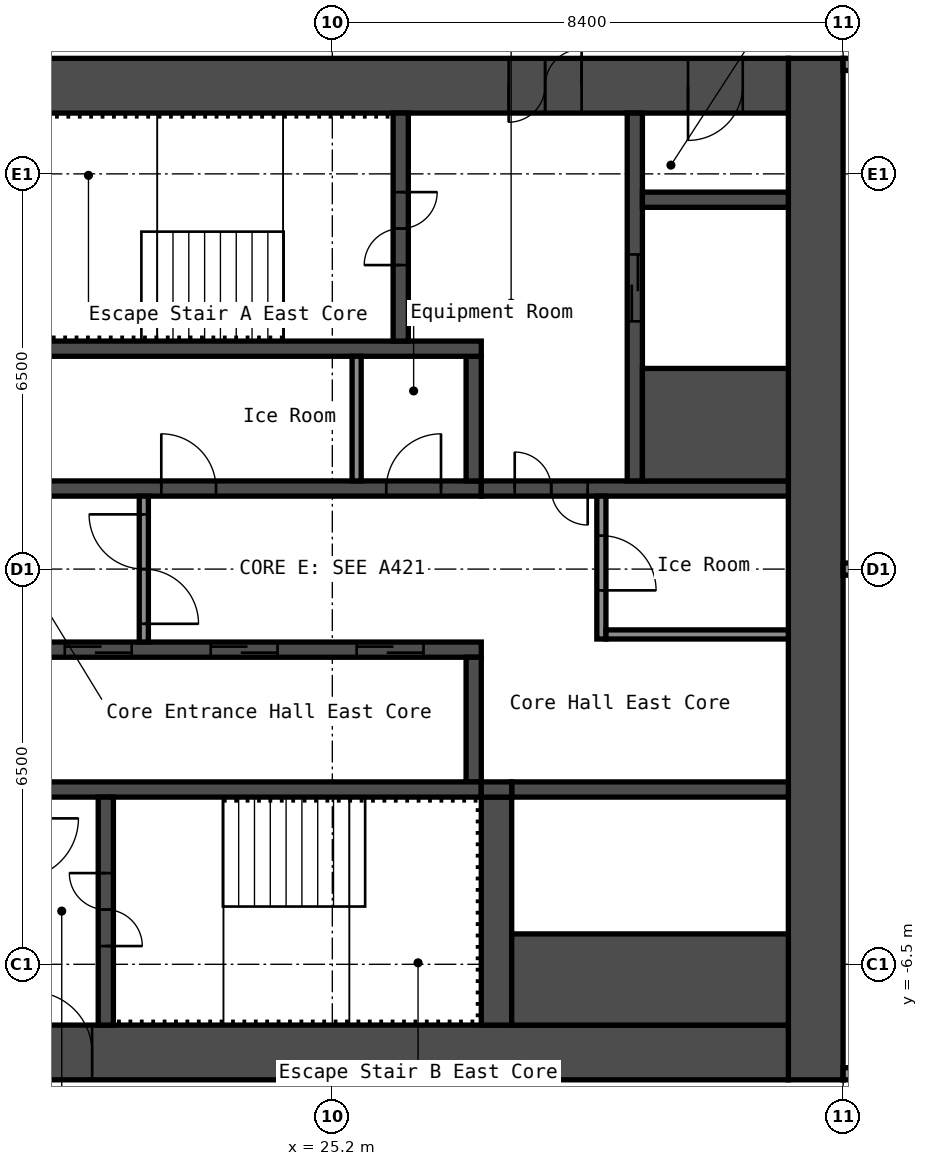
"""IFC4 building model, lengths in metres.
Left out: names, types, materials, properties, quantities, classifications, styles, units other than length and angle.
Written with IfcOpenShell. Run it as: python <this file> out.ifc"""

import sys

from ifc_helpers import new_model, si_unit, direction, frame, frame_2d, origin, place, context, subcontext, project, spatial, rectangle, extrude, element, fill, save


model = new_model("IFC4")
c1 = context("Model", 3, precision=1e-05, world=origin(), true_north=direction((0.0, 1.0)))
c2 = subcontext(c1, "Body", "Model", "MODEL_VIEW")
j1 = project(units=[si_unit("LENGTHUNIT", "METRE"), si_unit("PLANEANGLEUNIT", "RADIAN")], contexts=[c1])
p1 = place(None, origin())
s1 = spatial("IfcSite", under=j1, at=p1, CompositionType="ELEMENT")
p2 = place(p1, origin())
s2 = spatial("IfcBuilding", under=s1, at=p2, CompositionType="ELEMENT")
p3 = place(p2, frame((0.0, 0.0, 134.2)))
s3 = spatial("IfcBuildingStorey", under=s2, at=p3, CompositionType="ELEMENT", Elevation=134.2)
p4 = place(p3, frame((33.15, -8.4, 0.0), z_axis=(0.0, 0.0, 1.0), x_axis=(0.0, 1.0, 0.0)))
e1 = element("IfcWall", 1, at=p4, inside=s3, PredefinedType="SHEAR", context=c2, shape_type="SweptSolid", body=[
    extrude(rectangle(XDim=16.8, YDim=0.9, at=frame_2d((8.4, 0.0))), origin(), (0.0, 0.0, 1.0), 2.75),
])
p5 = place(p3, frame((17.7, 7.95, 0.0), z_axis=(0.0, 0.0, 1.0), x_axis=(1.0, 0.0, 0.0)))
e2 = element("IfcWall", 2, at=p5, inside=s3, PredefinedType="SHEAR", context=c2, shape_type="SweptSolid", body=[
    extrude(rectangle(XDim=15.0, YDim=0.9, at=frame_2d((7.5, 0.0))), origin(), (0.0, 0.0, 1.0), 2.75),
])
p6 = place(p5, frame((10.4, 0.0, 0.0)))
e3 = element("IfcOpeningElement", 3, at=p6, cuts=e2, PredefinedType="OPENING", context=c2, shape_type="SweptSolid", body=[
    extrude(rectangle(XDim=1.2, YDim=2.1, at=frame_2d((0.6, 1.05))), frame((0.0, 0.46, 0.0), z_axis=(0.0, -1.0, 0.0), x_axis=(1.0, 0.0, 0.0)), (0.0, 0.0, 1.0), 0.92),
])
p7 = place(p5, frame((13.35, 0.0, 0.0)))
e4 = element("IfcOpeningElement", 4, at=p7, cuts=e2, PredefinedType="OPENING", context=c2, shape_type="SweptSolid", body=[
    extrude(rectangle(XDim=0.9, YDim=2.1, at=frame_2d((0.45, 1.05))), frame((0.0, 0.46, 0.0), z_axis=(0.0, -1.0, 0.0), x_axis=(1.0, 0.0, 0.0)), (0.0, 0.0, 1.0), 0.92),
])
p8 = place(p3, frame((17.7, -7.95, 0.0), z_axis=(0.0, 0.0, 1.0), x_axis=(1.0, 0.0, 0.0)))
e5 = element("IfcWall", 5, at=p8, inside=s3, PredefinedType="SHEAR", context=c2, shape_type="SweptSolid", body=[
    extrude(rectangle(XDim=15.0, YDim=0.9, at=frame_2d((7.5, 0.0))), origin(), (0.0, 0.0, 1.0), 2.75),
])
p9 = place(p8, frame((2.55, 0.0, 0.0)))
e6 = element("IfcOpeningElement", 6, at=p9, cuts=e5, PredefinedType="OPENING", context=c2, shape_type="SweptSolid", body=[
    extrude(rectangle(XDim=1.0, YDim=2.1, at=frame_2d((0.5, 1.05))), frame((0.0, 0.46, 0.0), z_axis=(0.0, -1.0, 0.0), x_axis=(1.0, 0.0, 0.0)), (0.0, 0.0, 1.0), 0.92),
])
p10 = place(p3, frame((20.15, 1.325, 0.0), z_axis=(0.0, 0.0, 1.0), x_axis=(1.0, 0.0, 0.0)))
e7 = element("IfcWall", 7, at=p10, inside=s3, PredefinedType="SHEAR", context=c2, shape_type="SweptSolid", body=[
    extrude(rectangle(XDim=7.5, YDim=0.25, at=frame_2d((3.75, 0.0))), origin(), (0.0, 0.0, 1.0), 2.75),
])
p11 = place(p10, frame((2.238, 0.0, 0.0)))
e8 = element("IfcOpeningElement", 8, at=p11, cuts=e7, PredefinedType="OPENING", context=c2, shape_type="SweptSolid", body=[
    extrude(rectangle(XDim=0.9, YDim=2.1, at=frame_2d((0.45, 1.05))), frame((0.0, 0.135, 0.0), z_axis=(0.0, -1.0, 0.0), x_axis=(1.0, 0.0, 0.0)), (0.0, 0.0, 1.0), 0.27),
])
p12 = place(p10, frame((5.938, 0.0, 0.0)))
e9 = element("IfcOpeningElement", 9, at=p12, cuts=e7, PredefinedType="OPENING", context=c2, shape_type="SweptSolid", body=[
    extrude(rectangle(XDim=0.9, YDim=2.1, at=frame_2d((0.45, 1.05))), frame((0.0, 0.135, 0.0), z_axis=(0.0, -1.0, 0.0), x_axis=(1.0, 0.0, 0.0)), (0.0, 0.0, 1.0), 0.27),
])
p13 = place(p3, frame((27.525, 1.45, 0.0), z_axis=(0.0, 0.0, 1.0), x_axis=(0.0, 1.0, 0.0)))
e10 = element("IfcWall", 10, at=p13, inside=s3, PredefinedType="SHEAR", context=c2, shape_type="SweptSolid", body=[
    extrude(rectangle(XDim=2.05, YDim=0.25, at=frame_2d((1.025, 0.0))), origin(), (0.0, 0.0, 1.0), 2.75),
])
p14 = place(p3, frame((20.15, 3.625, 0.0), z_axis=(0.0, 0.0, 1.0), x_axis=(1.0, 0.0, 0.0)))
e11 = element("IfcWall", 11, at=p14, inside=s3, PredefinedType="SHEAR", context=c2, shape_type="SweptSolid", body=[
    extrude(rectangle(XDim=7.5, YDim=0.25, at=frame_2d((3.75, 0.0))), origin(), (0.0, 0.0, 1.0), 2.75),
])
p15 = place(p3, frame((26.325, 3.75, 0.0), z_axis=(0.0, 0.0, 1.0), x_axis=(0.0, 1.0, 0.0)))
e12 = element("IfcWall", 12, at=p15, inside=s3, PredefinedType="SHEAR", context=c2, shape_type="SweptSolid", body=[
    extrude(rectangle(XDim=3.75, YDim=0.25, at=frame_2d((1.875, 0.0))), origin(), (0.0, 0.0, 1.0), 2.75),
])
p16 = place(p15, frame((1.25, 0.0, 0.0)))
e13 = element("IfcOpeningElement", 13, at=p16, cuts=e12, PredefinedType="OPENING", context=c2, shape_type="SweptSolid", body=[
    extrude(rectangle(XDim=1.2, YDim=2.1, at=frame_2d((0.6, 1.05))), frame((0.0, 0.135, 0.0), z_axis=(0.0, -1.0, 0.0), x_axis=(1.0, 0.0, 0.0)), (0.0, 0.0, 1.0), 0.27),
])
p17 = place(p3, frame((27.65, 1.325, 0.0), z_axis=(0.0, 0.0, 1.0), x_axis=(1.0, 0.0, 0.0)))
e14 = element("IfcWall", 14, at=p17, inside=s3, PredefinedType="SHEAR", context=c2, shape_type="SweptSolid", body=[
    extrude(rectangle(XDim=5.05, YDim=0.25, at=frame_2d((2.525, 0.0))), origin(), (0.0, 0.0, 1.0), 2.75),
])
p18 = place(p17, frame((0.55, 0.0, 0.0)))
e15 = element("IfcOpeningElement", 15, at=p18, cuts=e14, PredefinedType="OPENING", context=c2, shape_type="SweptSolid", body=[
    extrude(rectangle(XDim=1.2, YDim=2.1, at=frame_2d((0.6, 1.05))), frame((0.0, 0.135, 0.0), z_axis=(0.0, -1.0, 0.0), x_axis=(1.0, 0.0, 0.0)), (0.0, 0.0, 1.0), 0.27),
])
p19 = place(p3, frame((30.175, 1.45, 0.0), z_axis=(0.0, 0.0, 1.0), x_axis=(0.0, 1.0, 0.0)))
e16 = element("IfcWall", 16, at=p19, inside=s3, PredefinedType="SHEAR", context=c2, shape_type="SweptSolid", body=[
    extrude(rectangle(XDim=6.05, YDim=0.25, at=frame_2d((3.025, 0.0))), origin(), (0.0, 0.0, 1.0), 2.75),
])
p20 = place(p19, frame((2.625, 0.0, 0.0)))
e17 = element("IfcOpeningElement", 17, at=p20, cuts=e16, PredefinedType="OPENING", context=c2, shape_type="SweptSolid", body=[
    extrude(rectangle(XDim=1.1, YDim=2.1, at=frame_2d((0.55, 1.05))), frame((0.0, 0.135, 0.0), z_axis=(0.0, -1.0, 0.0), x_axis=(1.0, 0.0, 0.0)), (0.0, 0.0, 1.0), 0.27),
])
p21 = place(p3, frame((30.3, 2.375, 0.0), z_axis=(0.0, 0.0, 1.0), x_axis=(1.0, 0.0, 0.0)))
e18 = element("IfcWall", 18, at=p21, inside=s3, PredefinedType="SHEAR", context=c2, shape_type="SweptSolid", body=[
    extrude(rectangle(XDim=2.4, YDim=1.85, at=frame_2d((1.2, 0.0))), origin(), (0.0, 0.0, 1.0), 2.75),
])
p22 = place(p3, frame((30.3, 6.075, 0.0), z_axis=(0.0, 0.0, 1.0), x_axis=(1.0, 0.0, 0.0)))
e19 = element("IfcWall", 19, at=p22, inside=s3, PredefinedType="SHEAR", context=c2, shape_type="SweptSolid", body=[
    extrude(rectangle(XDim=2.4, YDim=0.25, at=frame_2d((1.2, 0.0))), origin(), (0.0, 0.0, 1.0), 2.75),
])
p23 = place(p3, frame((20.15, -1.325, 0.0), z_axis=(0.0, 0.0, 1.0), x_axis=(1.0, 0.0, 0.0)))
e20 = element("IfcWall", 20, at=p23, inside=s3, PredefinedType="SHEAR", context=c2, shape_type="SweptSolid", body=[
    extrude(rectangle(XDim=7.5, YDim=0.25, at=frame_2d((3.75, 0.0))), origin(), (0.0, 0.0, 1.0), 2.75),
])
p24 = place(p23, frame((0.65, 0.0, 0.0)))
e21 = element("IfcOpeningElement", 21, at=p24, cuts=e20, PredefinedType="OPENING", context=c2, shape_type="SweptSolid", body=[
    extrude(rectangle(XDim=1.1, YDim=2.1, at=frame_2d((0.55, 1.05))), frame((0.0, 0.135, 0.0), z_axis=(0.0, -1.0, 0.0), x_axis=(1.0, 0.0, 0.0)), (0.0, 0.0, 1.0), 0.27),
])
p25 = place(p23, frame((3.05, 0.0, 0.0)))
e22 = element("IfcOpeningElement", 22, at=p25, cuts=e20, PredefinedType="OPENING", context=c2, shape_type="SweptSolid", body=[
    extrude(rectangle(XDim=1.1, YDim=2.1, at=frame_2d((0.55, 1.05))), frame((0.0, 0.135, 0.0), z_axis=(0.0, -1.0, 0.0), x_axis=(1.0, 0.0, 0.0)), (0.0, 0.0, 1.0), 0.27),
])
p26 = place(p23, frame((5.45, 0.0, 0.0)))
e23 = element("IfcOpeningElement", 23, at=p26, cuts=e20, PredefinedType="OPENING", context=c2, shape_type="SweptSolid", body=[
    extrude(rectangle(XDim=1.1, YDim=2.1, at=frame_2d((0.55, 1.05))), frame((0.0, 0.135, 0.0), z_axis=(0.0, -1.0, 0.0), x_axis=(1.0, 0.0, 0.0)), (0.0, 0.0, 1.0), 0.27),
])
p27 = place(p3, frame((27.525, -3.5, 0.0), z_axis=(0.0, 0.0, 1.0), x_axis=(0.0, 1.0, 0.0)))
e24 = element("IfcWall", 24, at=p27, inside=s3, PredefinedType="SHEAR", context=c2, shape_type="SweptSolid", body=[
    extrude(rectangle(XDim=2.05, YDim=0.25, at=frame_2d((1.025, 0.0))), origin(), (0.0, 0.0, 1.0), 2.75),
])
p28 = place(p3, frame((20.15, -3.625, 0.0), z_axis=(0.0, 0.0, 1.0), x_axis=(1.0, 0.0, 0.0)))
e25 = element("IfcWall", 25, at=p28, inside=s3, PredefinedType="SHEAR", context=c2, shape_type="SweptSolid", body=[
    extrude(rectangle(XDim=7.5, YDim=0.25, at=frame_2d((3.75, 0.0))), origin(), (0.0, 0.0, 1.0), 2.75),
])
p29 = place(p3, frame((21.475, -7.5, 0.0), z_axis=(0.0, 0.0, 1.0), x_axis=(0.0, 1.0, 0.0)))
e26 = element("IfcWall", 26, at=p29, inside=s3, PredefinedType="SHEAR", context=c2, shape_type="SweptSolid", body=[
    extrude(rectangle(XDim=3.75, YDim=0.25, at=frame_2d((1.875, 0.0))), origin(), (0.0, 0.0, 1.0), 2.75),
])
p30 = place(p29, frame((1.3, 0.0, 0.0)))
e27 = element("IfcOpeningElement", 27, at=p30, cuts=e26, PredefinedType="OPENING", context=c2, shape_type="SweptSolid", body=[
    extrude(rectangle(XDim=1.2, YDim=2.1, at=frame_2d((0.6, 1.05))), frame((0.0, 0.135, 0.0), z_axis=(0.0, -1.0, 0.0), x_axis=(1.0, 0.0, 0.0)), (0.0, 0.0, 1.0), 0.27),
])
p31 = place(p3, frame((27.9, -7.5, 0.0), z_axis=(0.0, 0.0, 1.0), x_axis=(0.0, 1.0, 0.0)))
e28 = element("IfcWall", 28, at=p31, inside=s3, PredefinedType="SHEAR", context=c2, shape_type="SweptSolid", body=[
    extrude(rectangle(XDim=3.75, YDim=0.5, at=frame_2d((1.875, 0.0))), origin(), (0.0, 0.0, 1.0), 2.75),
])
p32 = place(p3, frame((28.15, -3.625, 0.0), z_axis=(0.0, 0.0, 1.0), x_axis=(1.0, 0.0, 0.0)))
e29 = element("IfcWall", 29, at=p32, inside=s3, PredefinedType="SHEAR", context=c2, shape_type="SweptSolid", body=[
    extrude(rectangle(XDim=4.55, YDim=0.25, at=frame_2d((2.275, 0.0))), origin(), (0.0, 0.0, 1.0), 2.75),
])
p33 = place(p3, frame((28.15, -6.75, 0.0), z_axis=(0.0, 0.0, 1.0), x_axis=(1.0, 0.0, 0.0)))
e30 = element("IfcWall", 30, at=p33, inside=s3, PredefinedType="SHEAR", context=c2, shape_type="SweptSolid", body=[
    extrude(rectangle(XDim=4.55, YDim=1.5, at=frame_2d((2.275, 0.0))), origin(), (0.0, 0.0, 1.0), 2.75),
])
p34 = place(p3, frame((27.65, -3.625, 0.0), z_axis=(0.0, 0.0, 1.0), x_axis=(1.0, 0.0, 0.0)))
e31 = element("IfcWall", 31, at=p34, inside=s3, PredefinedType="SHEAR", context=c2, shape_type="SweptSolid", body=[
    extrude(rectangle(XDim=0.5, YDim=0.25, at=frame_2d((0.25, 0.0))), origin(), (0.0, 0.0, 1.0), 2.75),
])
p35 = place(p3, frame((22.1, -1.2, 0.0), z_axis=(0.0, 0.0, 1.0), x_axis=(0.0, 1.0, 0.0)))
e32 = element("IfcWall", 32, at=p35, inside=s3, PredefinedType="PARTITIONING", context=c2, shape_type="SweptSolid", body=[
    extrude(rectangle(XDim=2.4, YDim=0.15, at=frame_2d((1.2, 0.0))), origin(), (0.0, 0.0, 1.0), 2.75),
])
p36 = place(p35, frame((0.3, 0.0, 0.0)))
e33 = element("IfcOpeningElement", 33, at=p36, cuts=e32, PredefinedType="OPENING", context=c2, shape_type="SweptSolid", body=[
    extrude(rectangle(XDim=1.8, YDim=2.1, at=frame_2d((0.9, 1.05))), frame((0.0, 0.085, 0.0), z_axis=(0.0, -1.0, 0.0), x_axis=(1.0, 0.0, 0.0)), (0.0, 0.0, 1.0), 0.17),
])
p37 = place(p3, frame((29.625, -1.15, 0.0), z_axis=(0.0, 0.0, 1.0), x_axis=(0.0, 1.0, 0.0)))
e34 = element("IfcWall", 34, at=p37, inside=s3, PredefinedType="PARTITIONING", context=c2, shape_type="SweptSolid", body=[
    extrude(rectangle(XDim=2.35, YDim=0.15, at=frame_2d((1.175, 0.0))), origin(), (0.0, 0.0, 1.0), 2.75),
])
p38 = place(p37, frame((0.8, 0.0, 0.0)))
e35 = element("IfcOpeningElement", 35, at=p38, cuts=e34, PredefinedType="OPENING", context=c2, shape_type="SweptSolid", body=[
    extrude(rectangle(XDim=0.9, YDim=2.1, at=frame_2d((0.45, 1.05))), frame((0.0, 0.085, 0.0), z_axis=(0.0, -1.0, 0.0), x_axis=(1.0, 0.0, 0.0)), (0.0, 0.0, 1.0), 0.17),
])
p39 = place(p3, frame((29.7, -1.075, 0.0), z_axis=(0.0, 0.0, 1.0), x_axis=(1.0, 0.0, 0.0)))
e36 = element("IfcWall", 36, at=p39, inside=s3, PredefinedType="PARTITIONING", context=c2, shape_type="SweptSolid", body=[
    extrude(rectangle(XDim=3.0, YDim=0.15, at=frame_2d((1.5, 0.0))), origin(), (0.0, 0.0, 1.0), 2.75),
])
p40 = place(p3, frame((25.6, 1.45, 0.0), z_axis=(0.0, 0.0, 1.0), x_axis=(0.0, 1.0, 0.0)))
e37 = element("IfcWall", 37, at=p40, inside=s3, PredefinedType="PARTITIONING", context=c2, shape_type="SweptSolid", body=[
    extrude(rectangle(XDim=2.05, YDim=0.15, at=frame_2d((1.025, 0.0))), origin(), (0.0, 0.0, 1.0), 2.75),
])
p41 = place(p3, frame((33.6, -8.3, 0.0), z_axis=(0.0, 0.0, 1.0), x_axis=(1.0, 0.0, 0.0)))
e38 = element("IfcWall", 38, at=p41, inside=s3, PredefinedType="PARTITIONING", context=c2, shape_type="SweptSolid", body=[
    extrude(rectangle(XDim=6.6, YDim=0.2, at=frame_2d((3.3, 0.0))), origin(), (0.0, 0.0, 1.0), 2.75),
])
p42 = place(p41, frame((0.74, 0.0, 0.0)))
e39 = element("IfcOpeningElement", 39, at=p42, cuts=e38, PredefinedType="OPENING", context=c2, shape_type="SweptSolid", body=[
    extrude(rectangle(XDim=0.9, YDim=2.1, at=frame_2d((0.45, 1.05))), frame((0.0, 0.11, 0.0), z_axis=(0.0, -1.0, 0.0), x_axis=(1.0, 0.0, 0.0)), (0.0, 0.0, 1.0), 0.22),
])
p43 = place(p41, frame((4.04, 0.0, 0.0)))
e40 = element("IfcOpeningElement", 40, at=p43, cuts=e38, PredefinedType="OPENING", context=c2, shape_type="SweptSolid", body=[
    extrude(rectangle(XDim=0.9, YDim=2.1, at=frame_2d((0.45, 1.05))), frame((0.0, 0.11, 0.0), z_axis=(0.0, -1.0, 0.0), x_axis=(1.0, 0.0, 0.0)), (0.0, 0.0, 1.0), 0.22),
])
p44 = place(p3, frame((33.6, 0.0, 0.0), z_axis=(0.0, 0.0, 1.0), x_axis=(1.0, 0.0, 0.0)))
e41 = element("IfcWall", 41, at=p44, inside=s3, PredefinedType="PARTITIONING", context=c2, shape_type="SweptSolid", body=[
    extrude(rectangle(XDim=6.5, YDim=0.2, at=frame_2d((3.25, 0.0))), origin(), (0.0, 0.0, 1.0), 2.75),
])
p45 = place(p3, frame((33.6, 8.3, 0.0), z_axis=(0.0, 0.0, 1.0), x_axis=(1.0, 0.0, 0.0)))
e42 = element("IfcWall", 42, at=p45, inside=s3, PredefinedType="PARTITIONING", context=c2, shape_type="SweptSolid", body=[
    extrude(rectangle(XDim=6.6, YDim=0.2, at=frame_2d((3.3, 0.0))), origin(), (0.0, 0.0, 1.0), 2.75),
])
p46 = place(p45, frame((1.33, 0.0, 0.0)))
e43 = element("IfcOpeningElement", 43, at=p46, cuts=e42, PredefinedType="OPENING", context=c2, shape_type="SweptSolid", body=[
    extrude(rectangle(XDim=0.9, YDim=2.1, at=frame_2d((0.45, 1.05))), frame((0.0, 0.11, 0.0), z_axis=(0.0, -1.0, 0.0), x_axis=(1.0, 0.0, 0.0)), (0.0, 0.0, 1.0), 0.22),
])
p47 = place(p45, frame((4.63, 0.0, 0.0)))
e44 = element("IfcOpeningElement", 44, at=p47, cuts=e42, PredefinedType="OPENING", context=c2, shape_type="SweptSolid", body=[
    extrude(rectangle(XDim=0.9, YDim=2.1, at=frame_2d((0.45, 1.05))), frame((0.0, 0.11, 0.0), z_axis=(0.0, -1.0, 0.0), x_axis=(1.0, 0.0, 0.0)), (0.0, 0.0, 1.0), 0.22),
])
p48 = place(p6, origin())
e45 = element("IfcDoor", 45, at=p48, inside=s3, OperationType="DOUBLE_DOOR_SINGLE_SWING", PredefinedType="DOOR", context=c2, shape_type="SweptSolid", body=[
    extrude(rectangle(XDim=1.2, YDim=2.1, at=frame_2d((0.6, 1.05))), frame((0.0, 0.025, 0.0), z_axis=(0.0, -1.0, 0.0), x_axis=(1.0, 0.0, 0.0)), (0.0, 0.0, 1.0), 0.05),
])
fill(e3, e45)
p49 = place(p7, origin())
e46 = element("IfcDoor", 46, at=p49, inside=s3, OperationType="SINGLE_SWING_LEFT", PredefinedType="DOOR", context=c2, shape_type="SweptSolid", body=[
    extrude(rectangle(XDim=0.9, YDim=2.1, at=frame_2d((0.45, 1.05))), frame((0.0, 0.025, 0.0), z_axis=(0.0, -1.0, 0.0), x_axis=(1.0, 0.0, 0.0)), (0.0, 0.0, 1.0), 0.05),
])
fill(e4, e46)
p50 = place(p9, origin())
e47 = element("IfcDoor", 47, at=p50, inside=s3, OperationType="SINGLE_SWING_RIGHT", PredefinedType="DOOR", context=c2, shape_type="SweptSolid", body=[
    extrude(rectangle(XDim=1.0, YDim=2.1, at=frame_2d((0.5, 1.05))), frame((0.0, 0.025, 0.0), z_axis=(0.0, -1.0, 0.0), x_axis=(1.0, 0.0, 0.0)), (0.0, 0.0, 1.0), 0.05),
])
fill(e6, e47)
p51 = place(p16, origin())
e48 = element("IfcDoor", 48, at=p51, inside=s3, OperationType="DOUBLE_DOOR_SINGLE_SWING", PredefinedType="DOOR", context=c2, shape_type="SweptSolid", body=[
    extrude(rectangle(XDim=1.2, YDim=2.1, at=frame_2d((0.6, 1.05))), frame((0.0, 0.025, 0.0), z_axis=(0.0, -1.0, 0.0), x_axis=(1.0, 0.0, 0.0)), (0.0, 0.0, 1.0), 0.05),
])
fill(e13, e48)
p52 = place(p30, origin())
e49 = element("IfcDoor", 49, at=p52, inside=s3, OperationType="DOUBLE_DOOR_SINGLE_SWING", PredefinedType="DOOR", context=c2, shape_type="SweptSolid", body=[
    extrude(rectangle(XDim=1.2, YDim=2.1, at=frame_2d((0.6, 1.05))), frame((0.0, 0.025, 0.0), z_axis=(0.0, -1.0, 0.0), x_axis=(1.0, 0.0, 0.0)), (0.0, 0.0, 1.0), 0.05),
])
fill(e27, e49)
p53 = place(p18, origin())
e50 = element("IfcDoor", 50, at=p53, inside=s3, OperationType="DOUBLE_DOOR_SINGLE_SWING", PredefinedType="DOOR", context=c2, shape_type="SweptSolid", body=[
    extrude(rectangle(XDim=1.2, YDim=2.1, at=frame_2d((0.6, 1.05))), frame((0.0, 0.025, 0.0), z_axis=(0.0, -1.0, 0.0), x_axis=(1.0, 0.0, 0.0)), (0.0, 0.0, 1.0), 0.05),
])
fill(e15, e50)
p54 = place(p36, origin())
e51 = element("IfcDoor", 51, at=p54, inside=s3, OperationType="DOUBLE_DOOR_SINGLE_SWING", PredefinedType="DOOR", context=c2, shape_type="SweptSolid", body=[
    extrude(rectangle(XDim=1.8, YDim=2.1, at=frame_2d((0.9, 1.05))), frame((0.0, 0.025, 0.0), z_axis=(0.0, -1.0, 0.0), x_axis=(1.0, 0.0, 0.0)), (0.0, 0.0, 1.0), 0.05),
])
fill(e33, e51)
p55 = place(p38, origin())
e52 = element("IfcDoor", 52, at=p55, inside=s3, OperationType="SINGLE_SWING_LEFT", PredefinedType="DOOR", context=c2, shape_type="SweptSolid", body=[
    extrude(rectangle(XDim=0.9, YDim=2.1, at=frame_2d((0.45, 1.05))), frame((0.0, 0.025, 0.0), z_axis=(0.0, -1.0, 0.0), x_axis=(1.0, 0.0, 0.0)), (0.0, 0.0, 1.0), 0.05),
])
fill(e35, e52)
p56 = place(p11, origin())
e53 = element("IfcDoor", 53, at=p56, inside=s3, OperationType="SINGLE_SWING_RIGHT", PredefinedType="DOOR", context=c2, shape_type="SweptSolid", body=[
    extrude(rectangle(XDim=0.9, YDim=2.1, at=frame_2d((0.45, 1.05))), frame((0.0, 0.025, 0.0), z_axis=(0.0, -1.0, 0.0), x_axis=(1.0, 0.0, 0.0)), (0.0, 0.0, 1.0), 0.05),
])
fill(e8, e53)
p57 = place(p12, origin())
e54 = element("IfcDoor", 54, at=p57, inside=s3, OperationType="SINGLE_SWING_LEFT", PredefinedType="DOOR", context=c2, shape_type="SweptSolid", body=[
    extrude(rectangle(XDim=0.9, YDim=2.1, at=frame_2d((0.45, 1.05))), frame((0.0, 0.025, 0.0), z_axis=(0.0, -1.0, 0.0), x_axis=(1.0, 0.0, 0.0)), (0.0, 0.0, 1.0), 0.05),
])
fill(e9, e54)
p58 = place(p24, origin())
e55 = element("IfcDoor", 55, at=p58, inside=s3, OperationType="DOUBLE_DOOR_SLIDING", PredefinedType="DOOR", context=c2, shape_type="SweptSolid", body=[
    extrude(rectangle(XDim=1.1, YDim=2.1, at=frame_2d((0.55, 1.05))), frame((0.0, 0.025, 0.0), z_axis=(0.0, -1.0, 0.0), x_axis=(1.0, 0.0, 0.0)), (0.0, 0.0, 1.0), 0.05),
])
fill(e21, e55)
p59 = place(p25, origin())
e56 = element("IfcDoor", 56, at=p59, inside=s3, OperationType="DOUBLE_DOOR_SLIDING", PredefinedType="DOOR", context=c2, shape_type="SweptSolid", body=[
    extrude(rectangle(XDim=1.1, YDim=2.1, at=frame_2d((0.55, 1.05))), frame((0.0, 0.025, 0.0), z_axis=(0.0, -1.0, 0.0), x_axis=(1.0, 0.0, 0.0)), (0.0, 0.0, 1.0), 0.05),
])
fill(e22, e56)
p60 = place(p26, origin())
e57 = element("IfcDoor", 57, at=p60, inside=s3, OperationType="DOUBLE_DOOR_SLIDING", PredefinedType="DOOR", context=c2, shape_type="SweptSolid", body=[
    extrude(rectangle(XDim=1.1, YDim=2.1, at=frame_2d((0.55, 1.05))), frame((0.0, 0.025, 0.0), z_axis=(0.0, -1.0, 0.0), x_axis=(1.0, 0.0, 0.0)), (0.0, 0.0, 1.0), 0.05),
])
fill(e23, e57)
p61 = place(p20, origin())
e58 = element("IfcDoor", 58, at=p61, inside=s3, OperationType="DOUBLE_DOOR_SLIDING", PredefinedType="DOOR", context=c2, shape_type="SweptSolid", body=[
    extrude(rectangle(XDim=1.1, YDim=2.1, at=frame_2d((0.55, 1.05))), frame((0.0, 0.025, 0.0), z_axis=(0.0, -1.0, 0.0), x_axis=(1.0, 0.0, 0.0)), (0.0, 0.0, 1.0), 0.05),
])
fill(e17, e58)
save(model, sys.argv[1])
